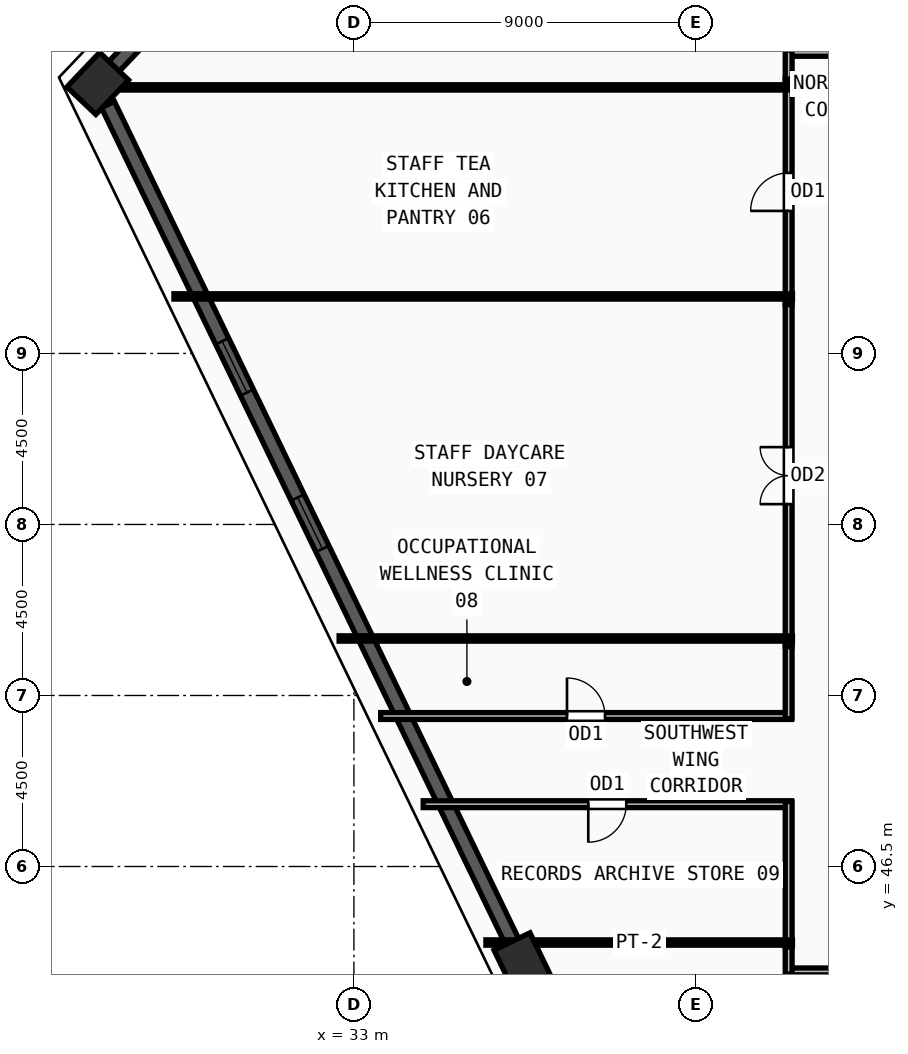
"""IFC4 building model, lengths in metres.
Left out: names, types, materials, properties, quantities, classifications, styles, units other than length and angle.
Written with IfcOpenShell. Run it as: python <this file> out.ifc"""

import sys

from ifc_helpers import new_model, si_unit, direction, frame, frame_2d, origin, origin_2d, place, context, subcontext, project, spatial, rectangle, extrude, source, transform, mapped, element, fill, save


model = new_model("IFC4")
c1 = context("Model", 3, precision=1e-05, world=origin(), true_north=direction((0.0, 1.0)))
c2 = subcontext(c1, "Body", "Model", "MODEL_VIEW")
j1 = project(units=[si_unit("LENGTHUNIT", "METRE"), si_unit("PLANEANGLEUNIT", "RADIAN")], contexts=[c1])
p1 = place(None, origin())
s1 = spatial("IfcSite", under=j1, at=p1, CompositionType="ELEMENT")
p2 = place(p1, origin())
s2 = spatial("IfcBuilding", under=s1, at=p2, CompositionType="ELEMENT")
p3 = place(p2, frame((0.0, 0.0, 201.75)))
s3 = spatial("IfcBuildingStorey", under=s2, at=p3, CompositionType="ELEMENT", Elevation=201.75)
m1 = source(origin(), c2, "Body", "SweptSolid", [
    extrude(rectangle(XDim=1.25, YDim=1.05, at=origin_2d()), origin(), (0.0, 0.0, 1.0), 3.75),
])
for number, where, z_axis, x_axis in (
    (1, (37.432, 43.964, 0.0), (0.0, 0.0, 1.0), (-0.435, 0.9, 0.0)),
    (2, (26.259, 67.103, 0.0), (0.0, 0.0, 1.0), (0.689, 0.724, 0.0)),
):
    element("IfcColumn", number, at=place(p3, frame(where, z_axis=z_axis, x_axis=x_axis)), inside=s3, PredefinedType="COLUMN", context=c2, shape_type="MappedRepresentation", body=[
        mapped(m1, transform((0.0, 0.0, 0.0), x_axis=(1.0, 0.0, 0.0), y_axis=(0.0, 1.0, 0.0), z_axis=(0.0, 0.0, 1.0), scale=1.0)),
    ])
p4 = place(p3, frame((29.752, 70.773, 0.0), z_axis=(0.0, 0.0, 1.0), x_axis=(-0.689477097778, -0.724307484181, 0.0)))
e3 = element("IfcWall", 3, at=p4, inside=s3, PredefinedType="SOLIDWALL", context=c2, shape_type="SweptSolid", body=[
    extrude(rectangle(XDim=4.451, YDim=0.38, at=frame_2d((2.226, 0.0))), origin(), (0.0, 0.0, 1.0), 3.57),
])
m2 = source(origin(), c2, "Body", "SweptSolid", [
    extrude(rectangle(XDim=1.2, YDim=1.9, at=frame_2d((0.6, 0.95))), frame((0.0, 0.2, 0.0), z_axis=(0.0, -1.0, 0.0), x_axis=(1.0, 0.0, 0.0)), (0.0, 0.0, 1.0), 0.4),
])
p5 = place(p4, frame((1.626, 0.0, 0.55)))
e4 = element("IfcOpeningElement", 4, at=p5, cuts=e3, PredefinedType="OPENING", context=c2, shape_type="MappedRepresentation", body=[
    mapped(m2, transform((0.0, 0.0, 0.0), x_axis=(1.0, 0.0, 0.0), y_axis=(0.0, 1.0, 0.0), z_axis=(0.0, 0.0, 1.0), scale=1.0)),
])
p6 = place(p3, frame((26.526, 66.549, 0.0), z_axis=(0.0, 0.0, 1.0), x_axis=(0.434865153575, -0.900495584779, 0.0)))
e5 = element("IfcWall", 5, at=p6, inside=s3, PredefinedType="SOLIDWALL", context=c2, shape_type="SweptSolid", body=[
    extrude(rectangle(XDim=24.465, YDim=0.38, at=frame_2d((12.233, 0.0))), origin(), (0.0, 0.0, 1.0), 3.57),
])
m3 = source(origin(), c2, "Body", "SweptSolid", [
    extrude(rectangle(XDim=1.5, YDim=1.9, at=frame_2d((0.75, 0.95))), frame((0.0, 0.2, 0.0), z_axis=(0.0, -1.0, 0.0), x_axis=(1.0, 0.0, 0.0)), (0.0, 0.0, 1.0), 0.4),
])
p7 = place(p6, frame((6.916, 0.0, 0.55)))
e6 = element("IfcOpeningElement", 6, at=p7, cuts=e5, PredefinedType="OPENING", context=c2, shape_type="MappedRepresentation", body=[
    mapped(m3, transform((0.0, 0.0, 0.0), x_axis=(1.0, 0.0, 0.0), y_axis=(0.0, 1.0, 0.0), z_axis=(0.0, 0.0, 1.0), scale=1.0)),
])
p8 = place(p6, frame((11.483, 0.0, 0.55)))
e7 = element("IfcOpeningElement", 7, at=p8, cuts=e5, PredefinedType="OPENING", context=c2, shape_type="MappedRepresentation", body=[
    mapped(m3, transform((0.0, 0.0, 0.0), x_axis=(1.0, 0.0, 0.0), y_axis=(0.0, 1.0, 0.0), z_axis=(0.0, 0.0, 1.0), scale=1.0)),
])
p9 = place(p3, frame((44.37, 67.91, 0.0), z_axis=(0.0, 0.0, 1.0), x_axis=(1.0, 0.0, 0.0)))
e8 = element("IfcWall", 8, at=p9, inside=s3, PredefinedType="PARTITIONING", context=c2, shape_type="SweptSolid", body=[
    extrude(rectangle(XDim=12.845, YDim=0.18, at=frame_2d((6.422, 0.0))), origin(), (0.0, 0.0, 1.0), 3.57),
])
m4 = source(origin(), c2, "Body", "SweptSolid", [
    extrude(rectangle(XDim=1.5, YDim=2.2, at=frame_2d((0.75, 1.1))), frame((0.0, 0.1, 0.0), z_axis=(0.0, -1.0, 0.0), x_axis=(1.0, 0.0, 0.0)), (0.0, 0.0, 1.0), 0.2),
])
p10 = place(p9, frame((5.673, 0.0, 0.0)))
e9 = element("IfcOpeningElement", 9, at=p10, cuts=e8, PredefinedType="OPENING", context=c2, shape_type="MappedRepresentation", body=[
    mapped(m4, transform((0.0, 0.0, 0.0), x_axis=(1.0, 0.0, 0.0), y_axis=(0.0, 1.0, 0.0), z_axis=(0.0, 0.0, 1.0), scale=1.0)),
])
p11 = place(p3, frame((44.44, 61.285, 0.0), z_axis=(0.0, 0.0, 1.0), x_axis=(0.0, 1.0, 0.0)))
e10 = element("IfcWall", 10, at=p11, inside=s3, PredefinedType="PARTITIONING", context=c2, shape_type="SweptSolid", body=[
    extrude(rectangle(XDim=5.93, YDim=0.18, at=frame_2d((2.965, 0.0))), origin(), (0.0, 0.0, 1.0), 3.57),
])
m5 = source(origin(), c2, "Body", "SweptSolid", [
    extrude(rectangle(XDim=1.0, YDim=2.2, at=frame_2d((0.5, 1.1))), frame((0.0, 0.1, 0.0), z_axis=(0.0, -1.0, 0.0), x_axis=(1.0, 0.0, 0.0)), (0.0, 0.0, 1.0), 0.2),
])
p12 = place(p11, frame((2.465, 0.0, 0.0)))
e11 = element("IfcOpeningElement", 11, at=p12, cuts=e10, PredefinedType="OPENING", context=c2, shape_type="MappedRepresentation", body=[
    mapped(m5, transform((0.0, 0.0, 0.0), x_axis=(1.0, 0.0, 0.0), y_axis=(0.0, 1.0, 0.0), z_axis=(0.0, 0.0, 1.0), scale=1.0)),
])
p13 = place(p3, frame((44.44, 52.285, 0.0), z_axis=(0.0, 0.0, 1.0), x_axis=(0.0, 1.0, 0.0)))
e12 = element("IfcWall", 12, at=p13, inside=s3, PredefinedType="PARTITIONING", context=c2, shape_type="SweptSolid", body=[
    extrude(rectangle(XDim=9.0, YDim=0.18, at=frame_2d((4.5, 0.0))), origin(), (0.0, 0.0, 1.0), 3.57),
])
p14 = place(p13, frame((3.75, 0.0, 0.0)))
e13 = element("IfcOpeningElement", 13, at=p14, cuts=e12, PredefinedType="OPENING", context=c2, shape_type="MappedRepresentation", body=[
    mapped(m4, transform((0.0, 0.0, 0.0), x_axis=(1.0, 0.0, 0.0), y_axis=(0.0, 1.0, 0.0), z_axis=(0.0, 0.0, 1.0), scale=1.0)),
])
p15 = place(p3, frame((33.704, 50.46, 0.0), z_axis=(0.0, 0.0, 1.0), x_axis=(1.0, 0.0, 0.0)))
e14 = element("IfcWall", 14, at=p15, inside=s3, PredefinedType="PARTITIONING", context=c2, shape_type="SweptSolid", body=[
    extrude(rectangle(XDim=10.806, YDim=0.18, at=frame_2d((5.403, 0.0))), origin(), (0.0, 0.0, 1.0), 3.57),
])
p16 = place(p15, frame((4.903, 0.0, 0.0)))
e15 = element("IfcOpeningElement", 15, at=p16, cuts=e14, PredefinedType="OPENING", context=c2, shape_type="MappedRepresentation", body=[
    mapped(m5, transform((0.0, 0.0, 0.0), x_axis=(1.0, 0.0, 0.0), y_axis=(0.0, 1.0, 0.0), z_axis=(0.0, 0.0, 1.0), scale=1.0)),
])
p17 = place(p3, frame((44.51, 48.14, 0.0), z_axis=(0.0, 0.0, 1.0), x_axis=(-1.0, 0.0, 0.0)))
e16 = element("IfcWall", 16, at=p17, inside=s3, PredefinedType="PARTITIONING", context=c2, shape_type="SweptSolid", body=[
    extrude(rectangle(XDim=9.686, YDim=0.18, at=frame_2d((4.843, 0.0))), origin(), (0.0, 0.0, 1.0), 3.57),
])
p18 = place(p17, frame((4.343, 0.0, 0.0)))
e17 = element("IfcOpeningElement", 17, at=p18, cuts=e16, PredefinedType="OPENING", context=c2, shape_type="MappedRepresentation", body=[
    mapped(m5, transform((0.0, 0.0, 0.0), x_axis=(1.0, 0.0, 0.0), y_axis=(0.0, 1.0, 0.0), z_axis=(0.0, 0.0, 1.0), scale=1.0)),
])
p19 = place(p3, frame((75.63, 43.74, 0.0), z_axis=(0.0, 0.0, 1.0), x_axis=(-1.0, 0.0, 0.0)))
e18 = element("IfcWall", 18, at=p19, inside=s3, PredefinedType="PARTITIONING", context=c2, shape_type="SweptSolid", body=[
    extrude(rectangle(XDim=31.26, YDim=0.18, at=frame_2d((15.63, 0.0))), origin(), (0.0, 0.0, 1.0), 3.57),
])
p20 = place(p19, frame((10.38, 0.0, 0.0)))
e19 = element("IfcOpeningElement", 19, at=p20, cuts=e18, PredefinedType="OPENING", context=c2, shape_type="MappedRepresentation", body=[
    mapped(m4, transform((0.0, 0.0, 0.0), x_axis=(1.0, 0.0, 0.0), y_axis=(0.0, 1.0, 0.0), z_axis=(0.0, 0.0, 1.0), scale=1.0)),
])
p21 = place(p3, frame((44.44, 67.215, 0.0), z_axis=(0.0, 0.0, 1.0), x_axis=(0.0, 1.0, 0.0)))
e20 = element("IfcWall", 20, at=p21, inside=s3, PredefinedType="PARTITIONING", context=c2, shape_type="SweptSolid", body=[
    extrude(rectangle(XDim=0.765, YDim=0.18, at=frame_2d((0.382, 0.0))), origin(), (0.0, 0.0, 1.0), 3.57),
])
p22 = place(p3, frame((44.44, 50.39, 0.0), z_axis=(0.0, 0.0, 1.0), x_axis=(0.0, 1.0, 0.0)))
e21 = element("IfcWall", 21, at=p22, inside=s3, PredefinedType="PARTITIONING", context=c2, shape_type="SweptSolid", body=[
    extrude(rectangle(XDim=1.895, YDim=0.18, at=frame_2d((0.948, 0.0))), origin(), (0.0, 0.0, 1.0), 3.57),
])
p23 = place(p3, frame((44.44, 44.385, 0.0), z_axis=(0.0, 0.0, 1.0), x_axis=(0.0, 1.0, 0.0)))
e22 = element("IfcWall", 22, at=p23, inside=s3, PredefinedType="PARTITIONING", context=c2, shape_type="SweptSolid", body=[
    extrude(rectangle(XDim=3.825, YDim=0.18, at=frame_2d((1.913, 0.0))), origin(), (0.0, 0.0, 1.0), 3.57),
])
p24 = place(p3, frame((44.44, 43.67, 0.0), z_axis=(0.0, 0.0, 1.0), x_axis=(0.0, 1.0, 0.0)))
e23 = element("IfcWall", 23, at=p24, inside=s3, PredefinedType="PARTITIONING", context=c2, shape_type="SweptSolid", body=[
    extrude(rectangle(XDim=0.715, YDim=0.18, at=frame_2d((0.357, 0.0))), origin(), (0.0, 0.0, 1.0), 3.57),
])
p25 = place(p3, frame((44.54, 44.5, 0.0), z_axis=(0.0, 0.0, 1.0), x_axis=(-1.0, 0.0, 0.0)))
e24 = element("IfcWall", 24, at=p25, inside=s3, PredefinedType="PARTITIONING", context=c2, shape_type="SweptSolid", body=[
    extrude(rectangle(XDim=8.066, YDim=0.14, at=frame_2d((4.033, 0.0))), origin(), (0.0, 0.0, 1.0), 3.57),
])
p26 = place(p3, frame((44.54, 52.5, 0.0), z_axis=(0.0, 0.0, 1.0), x_axis=(-1.0, 0.0, 0.0)))
e25 = element("IfcWall", 25, at=p26, inside=s3, PredefinedType="PARTITIONING", context=c2, shape_type="SweptSolid", body=[
    extrude(rectangle(XDim=11.929, YDim=0.14, at=frame_2d((5.964, 0.0))), origin(), (0.0, 0.0, 1.0), 3.57),
])
p27 = place(p3, frame((44.54, 61.5, 0.0), z_axis=(0.0, 0.0, 1.0), x_axis=(-1.0, 0.0, 0.0)))
e26 = element("IfcWall", 26, at=p27, inside=s3, PredefinedType="PARTITIONING", context=c2, shape_type="SweptSolid", body=[
    extrude(rectangle(XDim=16.275, YDim=0.14, at=frame_2d((8.138, 0.0))), origin(), (0.0, 0.0, 1.0), 3.57),
])
p28 = place(p3, frame((44.54, 67.0, 0.0), z_axis=(0.0, 0.0, 1.0), x_axis=(-1.0, 0.0, 0.0)))
e27 = element("IfcWall", 27, at=p28, inside=s3, PredefinedType="PARTITIONING", context=c2, shape_type="SweptSolid", body=[
    extrude(rectangle(XDim=18.931, YDim=0.14, at=frame_2d((9.466, 0.0))), origin(), (0.0, 0.0, 1.0), 2.855),
])
m6 = source(origin(), c2, "Body", "SweptSolid", [
    extrude(rectangle(XDim=1.5, YDim=1.9, at=frame_2d((0.75, 0.95))), frame((0.0, 0.03, 0.0), z_axis=(0.0, -1.0, 0.0), x_axis=(1.0, 0.0, 0.0)), (0.0, 0.0, 1.0), 0.06),
])
p29 = place(p7, origin())
e28 = element("IfcWindow", 28, at=p29, inside=s3, PartitioningType="DOUBLE_PANEL_VERTICAL", PredefinedType="WINDOW", context=c2, shape_type="MappedRepresentation", body=[
    mapped(m6, transform((0.0, 0.0, 0.0), x_axis=(1.0, 0.0, 0.0), y_axis=(0.0, 1.0, 0.0), z_axis=(0.0, 0.0, 1.0), scale=1.0)),
])
fill(e6, e28)
p30 = place(p8, origin())
e29 = element("IfcWindow", 29, at=p30, inside=s3, PartitioningType="DOUBLE_PANEL_VERTICAL", PredefinedType="WINDOW", context=c2, shape_type="MappedRepresentation", body=[
    mapped(m6, transform((0.0, 0.0, 0.0), x_axis=(1.0, 0.0, 0.0), y_axis=(0.0, 1.0, 0.0), z_axis=(0.0, 0.0, 1.0), scale=1.0)),
])
fill(e7, e29)
m7 = source(origin(), c2, "Body", "SweptSolid", [
    extrude(rectangle(XDim=1.0, YDim=2.2, at=frame_2d((0.5, 1.1))), frame((0.0, 0.025, 0.0), z_axis=(0.0, -1.0, 0.0), x_axis=(1.0, 0.0, 0.0)), (0.0, 0.0, 1.0), 0.05),
])
p31 = place(p12, origin())
e30 = element("IfcDoor", 30, at=p31, inside=s3, OperationType="SINGLE_SWING_LEFT", PredefinedType="DOOR", context=c2, shape_type="MappedRepresentation", body=[
    mapped(m7, transform((0.0, 0.0, 0.0), x_axis=(1.0, 0.0, 0.0), y_axis=(0.0, 1.0, 0.0), z_axis=(0.0, 0.0, 1.0), scale=1.0)),
])
fill(e11, e30)
m8 = source(origin(), c2, "Body", "SweptSolid", [
    extrude(rectangle(XDim=1.5, YDim=2.2, at=frame_2d((0.75, 1.1))), frame((0.0, 0.025, 0.0), z_axis=(0.0, -1.0, 0.0), x_axis=(1.0, 0.0, 0.0)), (0.0, 0.0, 1.0), 0.05),
])
p32 = place(p14, origin())
e31 = element("IfcDoor", 31, at=p32, inside=s3, OperationType="DOUBLE_DOOR_SINGLE_SWING", PredefinedType="DOOR", context=c2, shape_type="MappedRepresentation", body=[
    mapped(m8, transform((0.0, 0.0, 0.0), x_axis=(1.0, 0.0, 0.0), y_axis=(0.0, 1.0, 0.0), z_axis=(0.0, 0.0, 1.0), scale=1.0)),
])
fill(e13, e31)
p33 = place(p16, origin())
e32 = element("IfcDoor", 32, at=p33, inside=s3, OperationType="SINGLE_SWING_LEFT", PredefinedType="DOOR", context=c2, shape_type="MappedRepresentation", body=[
    mapped(m7, transform((0.0, 0.0, 0.0), x_axis=(1.0, 0.0, 0.0), y_axis=(0.0, 1.0, 0.0), z_axis=(0.0, 0.0, 1.0), scale=1.0)),
])
fill(e15, e32)
p34 = place(p18, origin())
e33 = element("IfcDoor", 33, at=p34, inside=s3, OperationType="SINGLE_SWING_RIGHT", PredefinedType="DOOR", context=c2, shape_type="MappedRepresentation", body=[
    mapped(m7, transform((0.0, 0.0, 0.0), x_axis=(1.0, 0.0, 0.0), y_axis=(0.0, 1.0, 0.0), z_axis=(0.0, 0.0, 1.0), scale=1.0)),
])
fill(e17, e33)
save(model, sys.argv[1])
